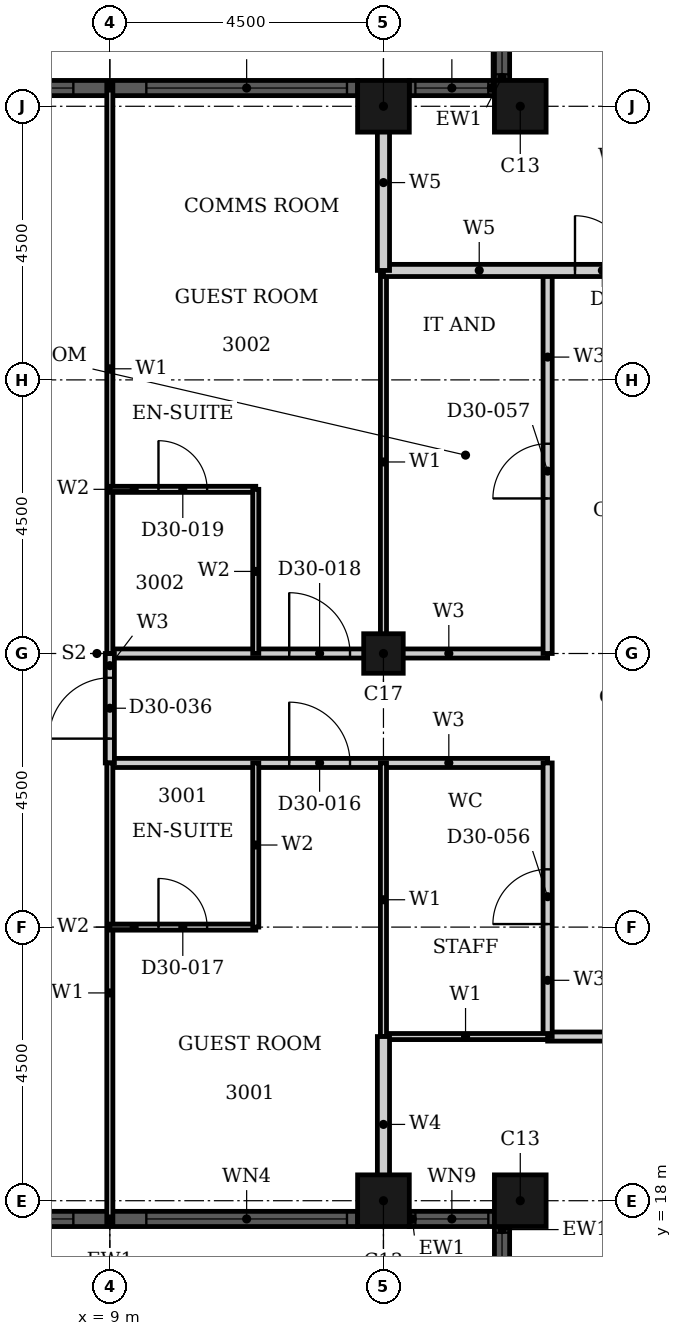
"""IFC4 building model, lengths in metres.
Left out: names, types, materials, properties, quantities, classifications, styles, units other than length and angle.
Written with IfcOpenShell. Run it as: python <this file> out.ifc"""

import sys

from ifc_helpers import new_model, si_unit, direction, frame, frame_2d, origin, origin_2d, place, context, subcontext, project, spatial, rectangle, hollow_rectangle, extrude, element, fill, save


model = new_model("IFC4")
c1 = context("Model", 3, precision=1e-05, world=origin(), true_north=direction((0.0, 1.0)))
c2 = subcontext(c1, "Body", "Model", "MODEL_VIEW")
j1 = project(units=[si_unit("LENGTHUNIT", "METRE"), si_unit("PLANEANGLEUNIT", "RADIAN")], contexts=[c1])
p1 = place(None, origin())
s1 = spatial("IfcSite", under=j1, at=p1, CompositionType="ELEMENT")
p2 = place(p1, origin())
s2 = spatial("IfcBuilding", under=s1, at=p2, CompositionType="ELEMENT")
p3 = place(p2, frame((0.0, 0.0, 122.4)))
s3 = spatial("IfcBuildingStorey", under=s2, at=p3, CompositionType="ELEMENT", Elevation=122.4)
for number, where, z_axis, x_axis in (
    (1, (15.75, 36.0, 0.0), (0.0, 0.0, 1.0), (1.0, 0.0, 0.0)),
    (2, (13.5, 36.0, 0.0), (0.0, 0.0, 1.0), (1.0, 0.0, 0.0)),
    (3, (13.5, 18.0, 0.0), (0.0, 0.0, 1.0), (1.0, 0.0, 0.0)),
    (4, (15.75, 18.0, 0.0), (0.0, 0.0, 1.0), (1.0, 0.0, 0.0)),
):
    element("IfcColumn", number, at=place(p3, frame(where, z_axis=z_axis, x_axis=x_axis)), inside=s3, PredefinedType="COLUMN", context=c2, shape_type="SweptSolid", body=[
        extrude(hollow_rectangle(XDim=0.85, YDim=0.85, WallThickness=0.026, at=origin_2d()), origin(), (0.0, 0.0, 1.0), 3.6),
    ])
p4 = place(p3, frame((13.5, 27.0, 0.0), z_axis=(0.0, 0.0, 1.0), x_axis=(1.0, 0.0, 0.0)))
e5 = element("IfcColumn", 5, at=p4, inside=s3, PredefinedType="COLUMN", context=c2, shape_type="SweptSolid", body=[
    extrude(hollow_rectangle(XDim=0.65, YDim=0.65, WallThickness=0.021, at=origin_2d()), origin(), (0.0, 0.0, 1.0), 3.6),
])
p5 = place(p3, frame((15.45, 37.825, 0.0), z_axis=(0.0, 0.0, 1.0), x_axis=(0.0, -1.0, 0.0)))
e6 = element("IfcWall", 6, at=p5, inside=s3, PredefinedType="SOLIDWALL", context=c2, shape_type="SweptSolid", body=[
    extrude(rectangle(XDim=1.4, YDim=0.25, at=frame_2d((0.7, 0.0))), origin(), (0.0, 0.0, 1.0), 3.6),
])
p6 = place(p5, frame((0.1, 0.0, 0.9)))
e7 = element("IfcOpeningElement", 7, at=p6, cuts=e6, PredefinedType="OPENING", context=c2, shape_type="SweptSolid", body=[
    extrude(rectangle(XDim=1.2, YDim=2.08, at=frame_2d((0.6, 1.04))), frame((0.0, 0.135, 0.0), z_axis=(0.0, -1.0, 0.0), x_axis=(1.0, 0.0, 0.0)), (0.0, 0.0, 1.0), 0.27),
])
p7 = place(p3, frame((15.325, 36.3, 0.0), z_axis=(0.0, 0.0, 1.0), x_axis=(-1.0, 0.0, 0.0)))
e8 = element("IfcWall", 8, at=p7, inside=s3, PredefinedType="SOLIDWALL", context=c2, shape_type="SweptSolid", body=[
    extrude(rectangle(XDim=1.4, YDim=0.25, at=frame_2d((0.7, 0.0))), origin(), (0.0, 0.0, 1.0), 3.6),
])
p8 = place(p7, frame((0.1, 0.0, 0.9)))
e9 = element("IfcOpeningElement", 9, at=p8, cuts=e8, PredefinedType="OPENING", context=c2, shape_type="SweptSolid", body=[
    extrude(rectangle(XDim=1.2, YDim=2.08, at=frame_2d((0.6, 1.04))), frame((0.0, 0.135, 0.0), z_axis=(0.0, -1.0, 0.0), x_axis=(1.0, 0.0, 0.0)), (0.0, 0.0, 1.0), 0.27),
])
p9 = place(p3, frame((13.075, 36.3, 0.0), z_axis=(0.0, 0.0, 1.0), x_axis=(-1.0, 0.0, 0.0)))
e10 = element("IfcWall", 10, at=p9, inside=s3, PredefinedType="SOLIDWALL", context=c2, shape_type="SweptSolid", body=[
    extrude(rectangle(XDim=8.15, YDim=0.25, at=frame_2d((4.075, 0.0))), origin(), (0.0, 0.0, 1.0), 3.6),
])
p10 = place(p9, frame((0.175, 0.0, 0.9)))
e11 = element("IfcOpeningElement", 11, at=p10, cuts=e10, PredefinedType="OPENING", context=c2, shape_type="SweptSolid", body=[
    extrude(rectangle(XDim=3.3, YDim=2.08, at=frame_2d((1.65, 1.04))), frame((0.0, 0.135, 0.0), z_axis=(0.0, -1.0, 0.0), x_axis=(1.0, 0.0, 0.0)), (0.0, 0.0, 1.0), 0.27),
])
p11 = place(p9, frame((4.675, 0.0, 0.9)))
e12 = element("IfcOpeningElement", 12, at=p11, cuts=e10, PredefinedType="OPENING", context=c2, shape_type="SweptSolid", body=[
    extrude(rectangle(XDim=3.3, YDim=2.08, at=frame_2d((1.65, 1.04))), frame((0.0, 0.135, 0.0), z_axis=(0.0, -1.0, 0.0), x_axis=(1.0, 0.0, 0.0)), (0.0, 0.0, 1.0), 0.27),
])
p12 = place(p3, frame((4.925, 17.7, 0.0), z_axis=(0.0, 0.0, 1.0), x_axis=(1.0, 0.0, 0.0)))
e13 = element("IfcWall", 13, at=p12, inside=s3, PredefinedType="SOLIDWALL", context=c2, shape_type="SweptSolid", body=[
    extrude(rectangle(XDim=8.15, YDim=0.25, at=frame_2d((4.075, 0.0))), origin(), (0.0, 0.0, 1.0), 3.6),
])
p13 = place(p12, frame((0.175, 0.0, 0.9)))
e14 = element("IfcOpeningElement", 14, at=p13, cuts=e13, PredefinedType="OPENING", context=c2, shape_type="SweptSolid", body=[
    extrude(rectangle(XDim=3.3, YDim=2.08, at=frame_2d((1.65, 1.04))), frame((0.0, 0.135, 0.0), z_axis=(0.0, -1.0, 0.0), x_axis=(1.0, 0.0, 0.0)), (0.0, 0.0, 1.0), 0.27),
])
p14 = place(p12, frame((4.675, 0.0, 0.9)))
e15 = element("IfcOpeningElement", 15, at=p14, cuts=e13, PredefinedType="OPENING", context=c2, shape_type="SweptSolid", body=[
    extrude(rectangle(XDim=3.3, YDim=2.08, at=frame_2d((1.65, 1.04))), frame((0.0, 0.135, 0.0), z_axis=(0.0, -1.0, 0.0), x_axis=(1.0, 0.0, 0.0)), (0.0, 0.0, 1.0), 0.27),
])
p15 = place(p3, frame((13.925, 17.7, 0.0), z_axis=(0.0, 0.0, 1.0), x_axis=(1.0, 0.0, 0.0)))
e16 = element("IfcWall", 16, at=p15, inside=s3, PredefinedType="SOLIDWALL", context=c2, shape_type="SweptSolid", body=[
    extrude(rectangle(XDim=1.4, YDim=0.25, at=frame_2d((0.7, 0.0))), origin(), (0.0, 0.0, 1.0), 3.6),
])
p16 = place(p15, frame((0.1, 0.0, 0.9)))
e17 = element("IfcOpeningElement", 17, at=p16, cuts=e16, PredefinedType="OPENING", context=c2, shape_type="SweptSolid", body=[
    extrude(rectangle(XDim=1.2, YDim=2.08, at=frame_2d((0.6, 1.04))), frame((0.0, 0.135, 0.0), z_axis=(0.0, -1.0, 0.0), x_axis=(1.0, 0.0, 0.0)), (0.0, 0.0, 1.0), 0.27),
])
p17 = place(p3, frame((15.45, 17.575, 0.0), z_axis=(0.0, 0.0, 1.0), x_axis=(0.0, -1.0, 0.0)))
e18 = element("IfcWall", 18, at=p17, inside=s3, PredefinedType="SOLIDWALL", context=c2, shape_type="SweptSolid", body=[
    extrude(rectangle(XDim=1.4, YDim=0.25, at=frame_2d((0.7, 0.0))), origin(), (0.0, 0.0, 1.0), 3.6),
])
p18 = place(p17, frame((0.1, 0.0, 0.9)))
e19 = element("IfcOpeningElement", 19, at=p18, cuts=e18, PredefinedType="OPENING", context=c2, shape_type="SweptSolid", body=[
    extrude(rectangle(XDim=1.2, YDim=2.08, at=frame_2d((0.6, 1.04))), frame((0.0, 0.135, 0.0), z_axis=(0.0, -1.0, 0.0), x_axis=(1.0, 0.0, 0.0)), (0.0, 0.0, 1.0), 0.27),
])
p19 = place(p3, frame((16.2, 20.7, 0.0), z_axis=(0.0, 0.0, 1.0), x_axis=(1.0, 0.0, 0.0)))
e20 = element("IfcWall", 20, at=p19, inside=s3, PredefinedType="PARTITIONING", context=c2, shape_type="SweptSolid", body=[
    extrude(rectangle(XDim=13.5, YDim=0.15, at=frame_2d((6.75, 0.0))), origin(), (0.0, 0.0, 1.0), 3.3),
])
p20 = place(p19, frame((4.75, 0.0, 0.0)))
e21 = element("IfcOpeningElement", 21, at=p20, cuts=e20, PredefinedType="OPENING", context=c2, shape_type="SweptSolid", body=[
    extrude(rectangle(XDim=1.0, YDim=2.1, at=frame_2d((0.5, 1.05))), frame((0.0, 0.085, 0.0), z_axis=(0.0, -1.0, 0.0), x_axis=(1.0, 0.0, 0.0)), (0.0, 0.0, 1.0), 0.17),
])
p21 = place(p19, frame((9.45, 0.0, 0.0)))
e22 = element("IfcOpeningElement", 22, at=p21, cuts=e20, PredefinedType="OPENING", context=c2, shape_type="SweptSolid", body=[
    extrude(rectangle(XDim=0.9, YDim=2.1, at=frame_2d((0.45, 1.05))), frame((0.0, 0.085, 0.0), z_axis=(0.0, -1.0, 0.0), x_axis=(1.0, 0.0, 0.0)), (0.0, 0.0, 1.0), 0.17),
])
p22 = place(p3, frame((9.0, 25.2, 0.0), z_axis=(0.0, 0.0, 1.0), x_axis=(1.0, 0.0, 0.0)))
e23 = element("IfcWall", 23, at=p22, inside=s3, PredefinedType="PARTITIONING", context=c2, shape_type="SweptSolid", body=[
    extrude(rectangle(XDim=7.2, YDim=0.15, at=frame_2d((3.6, 0.0))), origin(), (0.0, 0.0, 1.0), 3.3),
])
p23 = place(p22, frame((2.95, 0.0, 0.0)))
e24 = element("IfcOpeningElement", 24, at=p23, cuts=e23, PredefinedType="OPENING", context=c2, shape_type="SweptSolid", body=[
    extrude(rectangle(XDim=1.0, YDim=2.1, at=frame_2d((0.5, 1.05))), frame((0.0, 0.085, 0.0), z_axis=(0.0, -1.0, 0.0), x_axis=(1.0, 0.0, 0.0)), (0.0, 0.0, 1.0), 0.17),
])
p24 = place(p3, frame((9.0, 27.0, 0.0), z_axis=(0.0, 0.0, 1.0), x_axis=(1.0, 0.0, 0.0)))
e25 = element("IfcWall", 25, at=p24, inside=s3, PredefinedType="PARTITIONING", context=c2, shape_type="SweptSolid", body=[
    extrude(rectangle(XDim=7.2, YDim=0.15, at=frame_2d((3.6, 0.0))), origin(), (0.0, 0.0, 1.0), 2.58),
])
p25 = place(p24, frame((2.95, 0.0, 0.0)))
e26 = element("IfcOpeningElement", 26, at=p25, cuts=e25, PredefinedType="OPENING", context=c2, shape_type="SweptSolid", body=[
    extrude(rectangle(XDim=1.0, YDim=2.1, at=frame_2d((0.5, 1.05))), frame((0.0, 0.085, 0.0), z_axis=(0.0, -1.0, 0.0), x_axis=(1.0, 0.0, 0.0)), (0.0, 0.0, 1.0), 0.17),
])
p26 = place(p3, frame((16.2, 27.0, 0.0), z_axis=(0.0, 0.0, 1.0), x_axis=(0.0, 1.0, 0.0)))
e27 = element("IfcWall", 27, at=p26, inside=s3, PredefinedType="PARTITIONING", context=c2, shape_type="SweptSolid", body=[
    extrude(rectangle(XDim=6.3, YDim=0.15, at=frame_2d((3.15, 0.0))), origin(), (0.0, 0.0, 1.0), 3.3),
])
p27 = place(p26, frame((2.55, 0.0, 0.0)))
e28 = element("IfcOpeningElement", 28, at=p27, cuts=e27, PredefinedType="OPENING", context=c2, shape_type="SweptSolid", body=[
    extrude(rectangle(XDim=0.9, YDim=2.1, at=frame_2d((0.45, 1.05))), frame((0.0, 0.085, 0.0), z_axis=(0.0, -1.0, 0.0), x_axis=(1.0, 0.0, 0.0)), (0.0, 0.0, 1.0), 0.17),
])
p28 = place(p3, frame((16.2, 20.7, 0.0), z_axis=(0.0, 0.0, 1.0), x_axis=(0.0, 1.0, 0.0)))
e29 = element("IfcWall", 29, at=p28, inside=s3, PredefinedType="PARTITIONING", context=c2, shape_type="SweptSolid", body=[
    extrude(rectangle(XDim=4.5, YDim=0.15, at=frame_2d((2.25, 0.0))), origin(), (0.0, 0.0, 1.0), 3.3),
])
p29 = place(p28, frame((1.85, 0.0, 0.0)))
e30 = element("IfcOpeningElement", 30, at=p29, cuts=e29, PredefinedType="OPENING", context=c2, shape_type="SweptSolid", body=[
    extrude(rectangle(XDim=0.9, YDim=2.1, at=frame_2d((0.45, 1.05))), frame((0.0, 0.085, 0.0), z_axis=(0.0, -1.0, 0.0), x_axis=(1.0, 0.0, 0.0)), (0.0, 0.0, 1.0), 0.17),
])
p30 = place(p3, frame((9.0, 25.2, 0.0), z_axis=(0.0, 0.0, 1.0), x_axis=(0.0, 1.0, 0.0)))
e31 = element("IfcWall", 31, at=p30, inside=s3, PredefinedType="PARTITIONING", context=c2, shape_type="SweptSolid", body=[
    extrude(rectangle(XDim=1.8, YDim=0.15, at=frame_2d((0.9, 0.0))), origin(), (0.0, 0.0, 1.0), 3.3),
])
p31 = place(p30, frame((0.4, 0.0, 0.0)))
e32 = element("IfcOpeningElement", 32, at=p31, cuts=e31, PredefinedType="OPENING", context=c2, shape_type="SweptSolid", body=[
    extrude(rectangle(XDim=1.0, YDim=2.1, at=frame_2d((0.5, 1.05))), frame((0.0, 0.085, 0.0), z_axis=(0.0, -1.0, 0.0), x_axis=(1.0, 0.0, 0.0)), (0.0, 0.0, 1.0), 0.17),
])
p32 = place(p3, frame((13.5, 20.7, 0.0), z_axis=(0.0, 0.0, 1.0), x_axis=(1.0, 0.0, 0.0)))
e33 = element("IfcWall", 33, at=p32, inside=s3, PredefinedType="PARTITIONING", context=c2, shape_type="SweptSolid", body=[
    extrude(rectangle(XDim=2.7, YDim=0.1, at=frame_2d((1.35, 0.0))), origin(), (0.0, 0.0, 1.0), 3.3),
])
p33 = place(p3, frame((13.5, 27.0, 0.0), z_axis=(0.0, 0.0, 1.0), x_axis=(0.0, 1.0, 0.0)))
e34 = element("IfcWall", 34, at=p33, inside=s3, PredefinedType="PARTITIONING", context=c2, shape_type="SweptSolid", body=[
    extrude(rectangle(XDim=6.3, YDim=0.1, at=frame_2d((3.15, 0.0))), origin(), (0.0, 0.0, 1.0), 2.38),
])
p34 = place(p3, frame((13.5, 20.7, 0.0), z_axis=(0.0, 0.0, 1.0), x_axis=(0.0, 1.0, 0.0)))
e35 = element("IfcWall", 35, at=p34, inside=s3, PredefinedType="PARTITIONING", context=c2, shape_type="SweptSolid", body=[
    extrude(rectangle(XDim=4.5, YDim=0.1, at=frame_2d((2.25, 0.0))), origin(), (0.0, 0.0, 1.0), 2.38),
])
p35 = place(p3, frame((9.0, 27.0, 0.0), z_axis=(0.0, 0.0, 1.0), x_axis=(0.0, 1.0, 0.0)))
e36 = element("IfcWall", 36, at=p35, inside=s3, PredefinedType="PARTITIONING", context=c2, shape_type="SweptSolid", body=[
    extrude(rectangle(XDim=9.365, YDim=0.1, at=frame_2d((4.683, 0.0))), origin(), (0.0, 0.0, 1.0), 3.3),
])
p36 = place(p3, frame((9.0, 17.635, 0.0), z_axis=(0.0, 0.0, 1.0), x_axis=(0.0, 1.0, 0.0)))
e37 = element("IfcWall", 37, at=p36, inside=s3, PredefinedType="PARTITIONING", context=c2, shape_type="SweptSolid", body=[
    extrude(rectangle(XDim=7.565, YDim=0.1, at=frame_2d((3.782, 0.0))), origin(), (0.0, 0.0, 1.0), 3.3),
])
p37 = place(p3, frame((13.5, 17.81, 0.0), z_axis=(0.0, 0.0, 1.0), x_axis=(0.0, 1.0, 0.0)))
e38 = element("IfcWall", 38, at=p37, inside=s3, PredefinedType="PARTITIONING", context=c2, shape_type="SweptSolid", body=[
    extrude(rectangle(XDim=2.89, YDim=0.2, at=frame_2d((1.445, 0.0))), origin(), (0.0, 0.0, 1.0), 2.38),
])
p38 = place(p3, frame((9.0, 22.5, 0.0), z_axis=(0.0, 0.0, 1.0), x_axis=(1.0, 0.0, 0.0)))
e39 = element("IfcWall", 39, at=p38, inside=s3, PredefinedType="PARTITIONING", context=c2, shape_type="SweptSolid", body=[
    extrude(rectangle(XDim=2.4, YDim=0.1, at=frame_2d((1.2, 0.0))), origin(), (0.0, 0.0, 1.0), 2.58),
])
p39 = place(p38, frame((0.8, 0.0, 0.0)))
e40 = element("IfcOpeningElement", 40, at=p39, cuts=e39, PredefinedType="OPENING", context=c2, shape_type="SweptSolid", body=[
    extrude(rectangle(XDim=0.8, YDim=2.1, at=frame_2d((0.4, 1.05))), frame((0.0, 0.06, 0.0), z_axis=(0.0, -1.0, 0.0), x_axis=(1.0, 0.0, 0.0)), (0.0, 0.0, 1.0), 0.12),
])
p40 = place(p3, frame((9.0, 29.7, 0.0), z_axis=(0.0, 0.0, 1.0), x_axis=(1.0, 0.0, 0.0)))
e41 = element("IfcWall", 41, at=p40, inside=s3, PredefinedType="PARTITIONING", context=c2, shape_type="SweptSolid", body=[
    extrude(rectangle(XDim=2.4, YDim=0.1, at=frame_2d((1.2, 0.0))), origin(), (0.0, 0.0, 1.0), 3.3),
])
p41 = place(p40, frame((0.8, 0.0, 0.0)))
e42 = element("IfcOpeningElement", 42, at=p41, cuts=e41, PredefinedType="OPENING", context=c2, shape_type="SweptSolid", body=[
    extrude(rectangle(XDim=0.8, YDim=2.1, at=frame_2d((0.4, 1.05))), frame((0.0, 0.06, 0.0), z_axis=(0.0, -1.0, 0.0), x_axis=(1.0, 0.0, 0.0)), (0.0, 0.0, 1.0), 0.12),
])
for number, where, z_axis, x_axis in (
    (43, (11.4, 27.0, 0.0), (0.0, 0.0, 1.0), (0.0, 1.0, 0.0)),
    (44, (11.4, 22.5, 0.0), (0.0, 0.0, 1.0), (0.0, 1.0, 0.0)),
):
    element("IfcWall", number, at=place(p3, frame(where, z_axis=z_axis, x_axis=x_axis)), inside=s3, PredefinedType="PARTITIONING", context=c2, shape_type="SweptSolid", body=[
        extrude(rectangle(XDim=2.7, YDim=0.1, at=frame_2d((1.35, 0.0))), origin(), (0.0, 0.0, 1.0), 3.3),
    ])
p42 = place(p3, frame((13.5, 33.3, 0.0), z_axis=(0.0, 0.0, 1.0), x_axis=(1.0, 0.0, 0.0)))
e45 = element("IfcWall", 45, at=p42, inside=s3, PredefinedType="PARTITIONING", context=c2, shape_type="SweptSolid", body=[
    extrude(rectangle(XDim=4.5, YDim=0.2, at=frame_2d((2.25, 0.0))), origin(), (0.0, 0.0, 1.0), 3.3),
])
p43 = place(p42, frame((3.15, 0.0, 0.0)))
e46 = element("IfcOpeningElement", 46, at=p43, cuts=e45, PredefinedType="OPENING", context=c2, shape_type="SweptSolid", body=[
    extrude(rectangle(XDim=0.9, YDim=2.1, at=frame_2d((0.45, 1.05))), frame((0.0, 0.11, 0.0), z_axis=(0.0, -1.0, 0.0), x_axis=(1.0, 0.0, 0.0)), (0.0, 0.0, 1.0), 0.22),
])
p44 = place(p3, frame((13.5, 33.3, 0.0), z_axis=(0.0, 0.0, 1.0), x_axis=(0.0, 1.0, 0.0)))
e47 = element("IfcWall", 47, at=p44, inside=s3, PredefinedType="PARTITIONING", context=c2, shape_type="SweptSolid", body=[
    extrude(rectangle(XDim=2.89, YDim=0.2, at=frame_2d((1.445, 0.0))), origin(), (0.0, 0.0, 1.0), 2.38),
])
p45 = place(p6, origin())
e48 = element("IfcWindow", 48, at=p45, inside=s3, PartitioningType="SINGLE_PANEL", PredefinedType="WINDOW", context=c2, shape_type="SweptSolid", body=[
    extrude(rectangle(XDim=1.2, YDim=2.08, at=frame_2d((0.6, 1.04))), frame((0.0, 0.03, 0.0), z_axis=(0.0, -1.0, 0.0), x_axis=(1.0, 0.0, 0.0)), (0.0, 0.0, 1.0), 0.06),
])
fill(e7, e48)
p46 = place(p8, origin())
e49 = element("IfcWindow", 49, at=p46, inside=s3, PartitioningType="SINGLE_PANEL", PredefinedType="WINDOW", context=c2, shape_type="SweptSolid", body=[
    extrude(rectangle(XDim=1.2, YDim=2.08, at=frame_2d((0.6, 1.04))), frame((0.0, 0.03, 0.0), z_axis=(0.0, -1.0, 0.0), x_axis=(1.0, 0.0, 0.0)), (0.0, 0.0, 1.0), 0.06),
])
fill(e9, e49)
p47 = place(p10, origin())
e50 = element("IfcWindow", 50, at=p47, inside=s3, PartitioningType="SINGLE_PANEL", PredefinedType="WINDOW", context=c2, shape_type="SweptSolid", body=[
    extrude(rectangle(XDim=3.3, YDim=2.08, at=frame_2d((1.65, 1.04))), frame((0.0, 0.03, 0.0), z_axis=(0.0, -1.0, 0.0), x_axis=(1.0, 0.0, 0.0)), (0.0, 0.0, 1.0), 0.06),
])
fill(e11, e50)
p48 = place(p11, origin())
e51 = element("IfcWindow", 51, at=p48, inside=s3, PartitioningType="SINGLE_PANEL", PredefinedType="WINDOW", context=c2, shape_type="SweptSolid", body=[
    extrude(rectangle(XDim=3.3, YDim=2.08, at=frame_2d((1.65, 1.04))), frame((0.0, 0.03, 0.0), z_axis=(0.0, -1.0, 0.0), x_axis=(1.0, 0.0, 0.0)), (0.0, 0.0, 1.0), 0.06),
])
fill(e12, e51)
p49 = place(p13, origin())
e52 = element("IfcWindow", 52, at=p49, inside=s3, PartitioningType="SINGLE_PANEL", PredefinedType="WINDOW", context=c2, shape_type="SweptSolid", body=[
    extrude(rectangle(XDim=3.3, YDim=2.08, at=frame_2d((1.65, 1.04))), frame((0.0, 0.03, 0.0), z_axis=(0.0, -1.0, 0.0), x_axis=(1.0, 0.0, 0.0)), (0.0, 0.0, 1.0), 0.06),
])
fill(e14, e52)
p50 = place(p14, origin())
e53 = element("IfcWindow", 53, at=p50, inside=s3, PartitioningType="SINGLE_PANEL", PredefinedType="WINDOW", context=c2, shape_type="SweptSolid", body=[
    extrude(rectangle(XDim=3.3, YDim=2.08, at=frame_2d((1.65, 1.04))), frame((0.0, 0.03, 0.0), z_axis=(0.0, -1.0, 0.0), x_axis=(1.0, 0.0, 0.0)), (0.0, 0.0, 1.0), 0.06),
])
fill(e15, e53)
p51 = place(p16, origin())
e54 = element("IfcWindow", 54, at=p51, inside=s3, PartitioningType="SINGLE_PANEL", PredefinedType="WINDOW", context=c2, shape_type="SweptSolid", body=[
    extrude(rectangle(XDim=1.2, YDim=2.08, at=frame_2d((0.6, 1.04))), frame((0.0, 0.03, 0.0), z_axis=(0.0, -1.0, 0.0), x_axis=(1.0, 0.0, 0.0)), (0.0, 0.0, 1.0), 0.06),
])
fill(e17, e54)
p52 = place(p18, origin())
e55 = element("IfcWindow", 55, at=p52, inside=s3, PartitioningType="SINGLE_PANEL", PredefinedType="WINDOW", context=c2, shape_type="SweptSolid", body=[
    extrude(rectangle(XDim=1.2, YDim=2.08, at=frame_2d((0.6, 1.04))), frame((0.0, 0.03, 0.0), z_axis=(0.0, -1.0, 0.0), x_axis=(1.0, 0.0, 0.0)), (0.0, 0.0, 1.0), 0.06),
])
fill(e19, e55)
p53 = place(p23, origin())
e56 = element("IfcDoor", 56, at=p53, inside=s3, OperationType="SINGLE_SWING_RIGHT", PredefinedType="DOOR", context=c2, shape_type="SweptSolid", body=[
    extrude(rectangle(XDim=1.0, YDim=2.1, at=frame_2d((0.5, 1.05))), frame((0.0, 0.025, 0.0), z_axis=(0.0, -1.0, 0.0), x_axis=(1.0, 0.0, 0.0)), (0.0, 0.0, 1.0), 0.05),
])
fill(e24, e56)
p54 = place(p39, origin())
e57 = element("IfcDoor", 57, at=p54, inside=s3, OperationType="SINGLE_SWING_RIGHT", PredefinedType="DOOR", context=c2, shape_type="SweptSolid", body=[
    extrude(rectangle(XDim=0.8, YDim=2.1, at=frame_2d((0.4, 1.05))), frame((0.0, 0.025, 0.0), z_axis=(0.0, -1.0, 0.0), x_axis=(1.0, 0.0, 0.0)), (0.0, 0.0, 1.0), 0.05),
])
fill(e40, e57)
p55 = place(p25, origin())
e58 = element("IfcDoor", 58, at=p55, inside=s3, OperationType="SINGLE_SWING_RIGHT", PredefinedType="DOOR", context=c2, shape_type="SweptSolid", body=[
    extrude(rectangle(XDim=1.0, YDim=2.1, at=frame_2d((0.5, 1.05))), frame((0.0, 0.025, 0.0), z_axis=(0.0, -1.0, 0.0), x_axis=(1.0, 0.0, 0.0)), (0.0, 0.0, 1.0), 0.05),
])
fill(e26, e58)
p56 = place(p41, origin())
e59 = element("IfcDoor", 59, at=p56, inside=s3, OperationType="SINGLE_SWING_RIGHT", PredefinedType="DOOR", context=c2, shape_type="SweptSolid", body=[
    extrude(rectangle(XDim=0.8, YDim=2.1, at=frame_2d((0.4, 1.05))), frame((0.0, 0.025, 0.0), z_axis=(0.0, -1.0, 0.0), x_axis=(1.0, 0.0, 0.0)), (0.0, 0.0, 1.0), 0.05),
])
fill(e42, e59)
p57 = place(p31, origin())
e60 = element("IfcDoor", 60, at=p57, inside=s3, OperationType="SINGLE_SWING_RIGHT", PredefinedType="DOOR", context=c2, shape_type="SweptSolid", body=[
    extrude(rectangle(XDim=1.0, YDim=2.1, at=frame_2d((0.5, 1.05))), frame((0.0, 0.025, 0.0), z_axis=(0.0, -1.0, 0.0), x_axis=(1.0, 0.0, 0.0)), (0.0, 0.0, 1.0), 0.05),
])
fill(e32, e60)
p58 = place(p43, origin())
e61 = element("IfcDoor", 61, at=p58, inside=s3, OperationType="SINGLE_SWING_LEFT", PredefinedType="DOOR", context=c2, shape_type="SweptSolid", body=[
    extrude(rectangle(XDim=0.9, YDim=2.1, at=frame_2d((0.45, 1.05))), frame((0.0, 0.025, 0.0), z_axis=(0.0, -1.0, 0.0), x_axis=(1.0, 0.0, 0.0)), (0.0, 0.0, 1.0), 0.05),
])
fill(e46, e61)
p59 = place(p29, origin())
e62 = element("IfcDoor", 62, at=p59, inside=s3, OperationType="SINGLE_SWING_LEFT", PredefinedType="DOOR", context=c2, shape_type="SweptSolid", body=[
    extrude(rectangle(XDim=0.9, YDim=2.1, at=frame_2d((0.45, 1.05))), frame((0.0, 0.025, 0.0), z_axis=(0.0, -1.0, 0.0), x_axis=(1.0, 0.0, 0.0)), (0.0, 0.0, 1.0), 0.05),
])
fill(e30, e62)
p60 = place(p27, origin())
e63 = element("IfcDoor", 63, at=p60, inside=s3, OperationType="SINGLE_SWING_LEFT", PredefinedType="DOOR", context=c2, shape_type="SweptSolid", body=[
    extrude(rectangle(XDim=0.9, YDim=2.1, at=frame_2d((0.45, 1.05))), frame((0.0, 0.025, 0.0), z_axis=(0.0, -1.0, 0.0), x_axis=(1.0, 0.0, 0.0)), (0.0, 0.0, 1.0), 0.05),
])
fill(e28, e63)
save(model, sys.argv[1])
